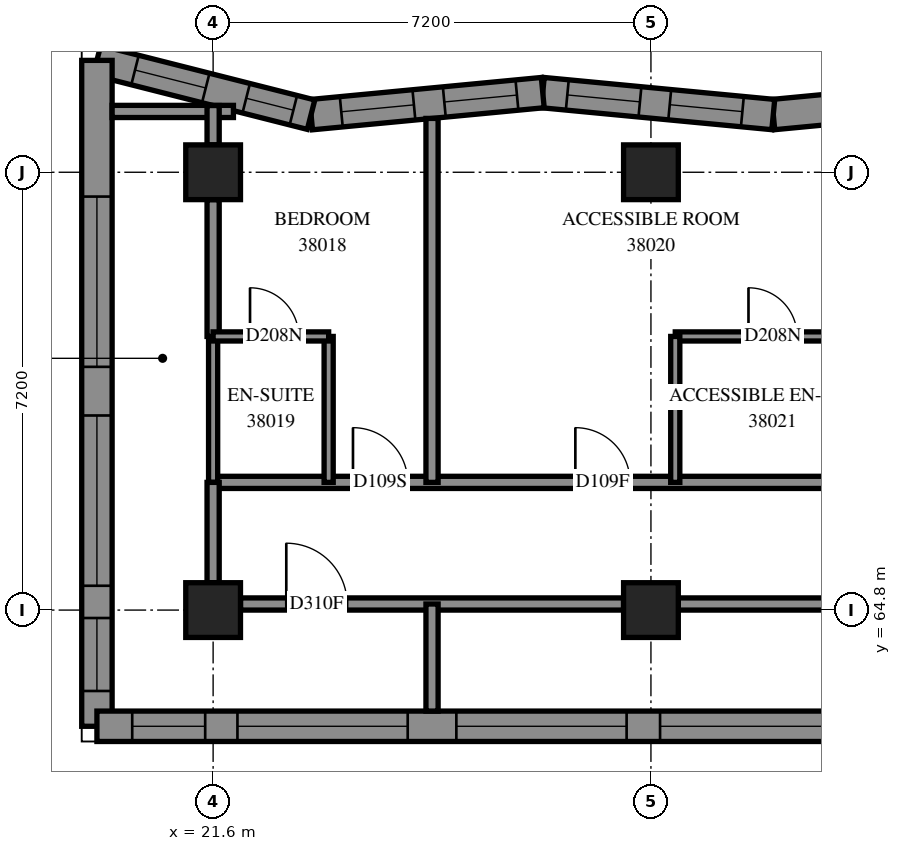
"""IFC4 building model, lengths in metres.
Left out: names, types, materials, properties, quantities, classifications, styles, units other than length and angle.
Written with IfcOpenShell. Run it as: python <this file> out.ifc"""

import sys

from ifc_helpers import new_model, si_unit, direction, frame, frame_2d, origin, origin_2d, place, context, subcontext, project, spatial, polyline, rectangle, outline, extrude, element, fill, save


model = new_model("IFC4")
c1 = context("Model", 3, precision=1e-05, world=origin(), true_north=direction((0.0, 1.0)))
c2 = subcontext(c1, "Body", "Model", "MODEL_VIEW")
j1 = project(units=[si_unit("LENGTHUNIT", "METRE"), si_unit("PLANEANGLEUNIT", "RADIAN")], contexts=[c1])
p1 = place(None, origin())
s1 = spatial("IfcSite", under=j1, at=p1, CompositionType="ELEMENT")
p2 = place(p1, origin())
s2 = spatial("IfcBuilding", under=s1, at=p2, CompositionType="ELEMENT")
p3 = place(p2, frame((0.0, 0.0, 142.2)))
s3 = spatial("IfcBuildingStorey", under=s2, at=p3, CompositionType="ELEMENT", Elevation=142.2)
for number, where, z_axis, x_axis in (
    (1, (21.6, 64.8, 0.0), (0.0, 0.0, 1.0), (1.0, 0.0, 0.0)),
    (2, (21.6, 72.0, 0.0), (0.0, 0.0, 1.0), (1.0, 0.0, 0.0)),
    (3, (28.8, 64.8, 0.0), (0.0, 0.0, 1.0), (1.0, 0.0, 0.0)),
    (4, (28.8, 72.0, 0.0), (0.0, 0.0, 1.0), (1.0, 0.0, 0.0)),
):
    element("IfcColumn", number, at=place(p3, frame(where, z_axis=z_axis, x_axis=x_axis)), inside=s3, PredefinedType="COLUMN", context=c2, shape_type="SweptSolid", body=[
        extrude(rectangle(XDim=0.9, YDim=0.9, at=origin_2d()), origin(), (0.0, 0.0, 1.0), 3.1),
    ])
p4 = place(p3, frame((34.603, 73.31, 0.0), z_axis=(0.0, 0.0, 1.0), x_axis=(-0.9954966527, -0.0947967005, 0.0)))
e5 = element("IfcWall", 5, at=p4, inside=s3, PredefinedType="SOLIDWALL", context=c2, shape_type="SweptSolid", body=[
    extrude(outline(polyline([(-0.024, -0.25), (3.784, -0.25), (3.832, 0.25), (0.024, 0.25), (-0.024, -0.25)])), origin(), (0.0, 0.0, 1.0), 3.1),
])
p5 = place(p4, frame((0.618, 0.0, 0.45)))
e6 = element("IfcOpeningElement", 6, at=p5, cuts=e5, PredefinedType="OPENING", context=c2, shape_type="SweptSolid", body=[
    extrude(rectangle(XDim=1.2, YDim=2.5, at=frame_2d((0.6, 1.25))), frame((0.0, 0.26, 0.0), z_axis=(0.0, -1.0, 0.0), x_axis=(1.0, 0.0, 0.0)), (0.0, 0.0, 1.0), 0.52),
])
p6 = place(p3, frame((30.812, 72.949, 0.0), z_axis=(0.0, 0.0, 1.0), x_axis=(-0.9954966527, 0.0947967005, 0.0)))
e7 = element("IfcWall", 7, at=p6, inside=s3, PredefinedType="SOLIDWALL", context=c2, shape_type="SweptSolid", body=[
    extrude(outline(polyline([(0.024, -0.25), (3.832, -0.25), (3.784, 0.25), (-0.024, 0.25), (0.024, -0.25)])), origin(), (0.0, 0.0, 1.0), 3.1),
])
p7 = place(p6, frame((0.511, 0.0, 0.45)))
e8 = element("IfcOpeningElement", 8, at=p7, cuts=e7, PredefinedType="OPENING", context=c2, shape_type="SweptSolid", body=[
    extrude(rectangle(XDim=1.2, YDim=2.5, at=frame_2d((0.6, 1.25))), frame((0.0, 0.26, 0.0), z_axis=(0.0, -1.0, 0.0), x_axis=(1.0, 0.0, 0.0)), (0.0, 0.0, 1.0), 0.52),
])
p8 = place(p6, frame((2.203, 0.0, 0.45)))
e9 = element("IfcOpeningElement", 9, at=p8, cuts=e7, PredefinedType="OPENING", context=c2, shape_type="SweptSolid", body=[
    extrude(rectangle(XDim=1.2, YDim=2.5, at=frame_2d((0.6, 1.25))), frame((0.0, 0.26, 0.0), z_axis=(0.0, -1.0, 0.0), x_axis=(1.0, 0.0, 0.0)), (0.0, 0.0, 1.0), 0.52),
])
p9 = place(p3, frame((27.021, 73.31, 0.0), z_axis=(0.0, 0.0, 1.0), x_axis=(-0.9954953552, -0.0948103255, 0.0)))
e10 = element("IfcWall", 10, at=p9, inside=s3, PredefinedType="SOLIDWALL", context=c2, shape_type="SweptSolid", body=[
    extrude(outline(polyline([(-0.024, -0.25), (3.784, -0.25), (3.871, 0.25), (0.024, 0.25), (-0.024, -0.25)])), origin(), (0.0, 0.0, 1.0), 3.1),
])
p10 = place(p9, frame((0.426, 0.0, 0.45)))
e11 = element("IfcOpeningElement", 11, at=p10, cuts=e10, PredefinedType="OPENING", context=c2, shape_type="SweptSolid", body=[
    extrude(rectangle(XDim=1.2, YDim=2.5, at=frame_2d((0.6, 1.25))), frame((0.0, 0.26, 0.0), z_axis=(0.0, -1.0, 0.0), x_axis=(1.0, 0.0, 0.0)), (0.0, 0.0, 1.0), 0.52),
])
p11 = place(p9, frame((2.128, 0.0, 0.45)))
e12 = element("IfcOpeningElement", 12, at=p11, cuts=e10, PredefinedType="OPENING", context=c2, shape_type="SweptSolid", body=[
    extrude(rectangle(XDim=1.2, YDim=2.5, at=frame_2d((0.6, 1.25))), frame((0.0, 0.26, 0.0), z_axis=(0.0, -1.0, 0.0), x_axis=(1.0, 0.0, 0.0)), (0.0, 0.0, 1.0), 0.52),
])
p12 = place(p3, frame((23.211, 72.947, 0.0), z_axis=(0.0, 0.0, 1.0), x_axis=(-0.9693406445, 0.2457208068, 0.0)))
e13 = element("IfcWall", 13, at=p12, inside=s3, PredefinedType="SOLIDWALL", context=c2, shape_type="SweptSolid", body=[
    extrude(outline(polyline([(0.043, -0.25), (3.954, -0.25), (3.312, 0.25), (-0.043, 0.25), (0.043, -0.25)])), origin(), (0.0, 0.0, 1.0), 3.1),
])
p13 = place(p12, frame((1.787, 0.0, 0.45)))
e14 = element("IfcOpeningElement", 14, at=p13, cuts=e13, PredefinedType="OPENING", context=c2, shape_type="SweptSolid", body=[
    extrude(rectangle(XDim=1.2, YDim=2.5, at=frame_2d((0.6, 1.25))), frame((0.0, 0.26, 0.0), z_axis=(0.0, -1.0, 0.0), x_axis=(1.0, 0.0, 0.0)), (0.0, 0.0, 1.0), 0.52),
])
p14 = place(p12, frame((0.3, 0.0, 0.45)))
e15 = element("IfcOpeningElement", 15, at=p14, cuts=e13, PredefinedType="OPENING", context=c2, shape_type="SweptSolid", body=[
    extrude(rectangle(XDim=0.8, YDim=2.5, at=frame_2d((0.4, 1.25))), frame((0.0, 0.26, 0.0), z_axis=(0.0, -1.0, 0.0), x_axis=(1.0, 0.0, 0.0)), (0.0, 0.0, 1.0), 0.52),
])
p15 = place(p3, frame((19.689, 73.84, 0.0), z_axis=(0.0, 0.0, 1.0), x_axis=(0.0, -1.0, 0.0)))
e16 = element("IfcWall", 16, at=p15, inside=s3, PredefinedType="SOLIDWALL", context=c2, shape_type="SweptSolid", body=[
    extrude(outline(polyline([(-0.321, -0.25), (11.201, -0.25), (10.701, 0.25), (0.321, 0.25), (-0.321, -0.25)])), origin(), (0.0, 0.0, 1.0), 3.1),
])
p16 = place(p15, frame((2.24, 0.0, 0.45)))
e17 = element("IfcOpeningElement", 17, at=p16, cuts=e16, PredefinedType="OPENING", context=c2, shape_type="SweptSolid", body=[
    extrude(rectangle(XDim=2.8, YDim=2.5, at=frame_2d((1.4, 1.25))), frame((0.0, 0.26, 0.0), z_axis=(0.0, -1.0, 0.0), x_axis=(1.0, 0.0, 0.0)), (0.0, 0.0, 1.0), 0.52),
])
p17 = place(p15, frame((5.84, 0.0, 0.45)))
e18 = element("IfcOpeningElement", 18, at=p17, cuts=e16, PredefinedType="OPENING", context=c2, shape_type="SweptSolid", body=[
    extrude(rectangle(XDim=2.8, YDim=2.5, at=frame_2d((1.4, 1.25))), frame((0.0, 0.26, 0.0), z_axis=(0.0, -1.0, 0.0), x_axis=(1.0, 0.0, 0.0)), (0.0, 0.0, 1.0), 0.52),
])
p18 = place(p15, frame((9.17, 0.0, 0.45)))
e19 = element("IfcOpeningElement", 19, at=p18, cuts=e16, PredefinedType="OPENING", context=c2, shape_type="SweptSolid", body=[
    extrude(rectangle(XDim=1.2, YDim=2.5, at=frame_2d((0.6, 1.25))), frame((0.0, 0.26, 0.0), z_axis=(0.0, -1.0, 0.0), x_axis=(1.0, 0.0, 0.0)), (0.0, 0.0, 1.0), 0.52),
])
p19 = place(p3, frame((19.689, 62.889, 0.0), z_axis=(0.0, 0.0, 1.0), x_axis=(1.0, 0.0, 0.0)))
e20 = element("IfcWall", 20, at=p19, inside=s3, PredefinedType="SOLIDWALL", context=c2, shape_type="SweptSolid", body=[
    extrude(outline(polyline([(-0.25, -0.25), (15.111, -0.25), (15.611, 0.25), (0.25, 0.25), (-0.25, -0.25)])), origin(), (0.0, 0.0, 1.0), 3.1),
])
p20 = place(p19, frame((2.311, 0.0, 0.45)))
e21 = element("IfcOpeningElement", 21, at=p20, cuts=e20, PredefinedType="OPENING", context=c2, shape_type="SweptSolid", body=[
    extrude(rectangle(XDim=2.8, YDim=2.5, at=frame_2d((1.4, 1.25))), frame((0.0, 0.26, 0.0), z_axis=(0.0, -1.0, 0.0), x_axis=(1.0, 0.0, 0.0)), (0.0, 0.0, 1.0), 0.52),
])
p21 = place(p19, frame((5.911, 0.0, 0.45)))
e22 = element("IfcOpeningElement", 22, at=p21, cuts=e20, PredefinedType="OPENING", context=c2, shape_type="SweptSolid", body=[
    extrude(rectangle(XDim=2.8, YDim=2.5, at=frame_2d((1.4, 1.25))), frame((0.0, 0.26, 0.0), z_axis=(0.0, -1.0, 0.0), x_axis=(1.0, 0.0, 0.0)), (0.0, 0.0, 1.0), 0.52),
])
p22 = place(p19, frame((9.261, 0.0, 0.45)))
e23 = element("IfcOpeningElement", 23, at=p22, cuts=e20, PredefinedType="OPENING", context=c2, shape_type="SweptSolid", body=[
    extrude(rectangle(XDim=2.8, YDim=2.5, at=frame_2d((1.4, 1.25))), frame((0.0, 0.26, 0.0), z_axis=(0.0, -1.0, 0.0), x_axis=(1.0, 0.0, 0.0)), (0.0, 0.0, 1.0), 0.52),
])
p23 = place(p19, frame((0.581, 0.0, 0.45)))
e24 = element("IfcOpeningElement", 24, at=p23, cuts=e20, PredefinedType="OPENING", context=c2, shape_type="SweptSolid", body=[
    extrude(rectangle(XDim=1.2, YDim=2.5, at=frame_2d((0.6, 1.25))), frame((0.0, 0.26, 0.0), z_axis=(0.0, -1.0, 0.0), x_axis=(1.0, 0.0, 0.0)), (0.0, 0.0, 1.0), 0.52),
])
p24 = place(p19, frame((13.336, 0.0, 0.45)))
e25 = element("IfcOpeningElement", 25, at=p24, cuts=e20, PredefinedType="OPENING", context=c2, shape_type="SweptSolid", body=[
    extrude(rectangle(XDim=1.2, YDim=2.5, at=frame_2d((0.6, 1.25))), frame((0.0, 0.26, 0.0), z_axis=(0.0, -1.0, 0.0), x_axis=(1.0, 0.0, 0.0)), (0.0, 0.0, 1.0), 0.52),
])
p25 = place(p3, frame((21.6, 66.9, 0.0), z_axis=(0.0, 0.0, 1.0), x_axis=(1.0, 0.0, 0.0)))
e26 = element("IfcWall", 26, at=p25, inside=s3, PredefinedType="PARTITIONING", context=c2, shape_type="SweptSolid", body=[
    extrude(rectangle(XDim=19.0, YDim=0.2, at=frame_2d((9.5, 0.0))), origin(), (0.0, 0.0, 1.0), 3.1),
])
p26 = place(p25, frame((2.3, 0.0, 0.0)))
e27 = element("IfcOpeningElement", 27, at=p26, cuts=e26, PredefinedType="OPENING", context=c2, shape_type="SweptSolid", body=[
    extrude(rectangle(XDim=0.9, YDim=2.1, at=frame_2d((0.45, 1.05))), frame((0.0, 0.11, 0.0), z_axis=(0.0, -1.0, 0.0), x_axis=(1.0, 0.0, 0.0)), (0.0, 0.0, 1.0), 0.22),
])
p27 = place(p25, frame((5.957, 0.0, 0.0)))
e28 = element("IfcOpeningElement", 28, at=p27, cuts=e26, PredefinedType="OPENING", context=c2, shape_type="SweptSolid", body=[
    extrude(rectangle(XDim=0.9, YDim=2.1, at=frame_2d((0.45, 1.05))), frame((0.0, 0.11, 0.0), z_axis=(0.0, -1.0, 0.0), x_axis=(1.0, 0.0, 0.0)), (0.0, 0.0, 1.0), 0.22),
])
p28 = place(p25, frame((13.057, 0.0, 0.0)))
e29 = element("IfcOpeningElement", 29, at=p28, cuts=e26, PredefinedType="OPENING", context=c2, shape_type="SweptSolid", body=[
    extrude(rectangle(XDim=0.9, YDim=2.1, at=frame_2d((0.45, 1.05))), frame((0.0, 0.11, 0.0), z_axis=(0.0, -1.0, 0.0), x_axis=(1.0, 0.0, 0.0)), (0.0, 0.0, 1.0), 0.22),
])
p29 = place(p3, frame((22.05, 64.9, 0.0), z_axis=(0.0, 0.0, 1.0), x_axis=(1.0, 0.0, 0.0)))
e30 = element("IfcWall", 30, at=p29, inside=s3, PredefinedType="PARTITIONING", context=c2, shape_type="SweptSolid", body=[
    extrude(rectangle(XDim=6.3, YDim=0.2, at=frame_2d((3.15, 0.0))), origin(), (0.0, 0.0, 1.0), 2.6),
])
p30 = place(p29, frame((0.753, 0.0, 0.0)))
e31 = element("IfcOpeningElement", 31, at=p30, cuts=e30, PredefinedType="OPENING", context=c2, shape_type="SweptSolid", body=[
    extrude(rectangle(XDim=1.0, YDim=2.1, at=frame_2d((0.5, 1.05))), frame((0.0, 0.11, 0.0), z_axis=(0.0, -1.0, 0.0), x_axis=(1.0, 0.0, 0.0)), (0.0, 0.0, 1.0), 0.22),
])
p31 = place(p3, frame((29.25, 64.9, 0.0), z_axis=(0.0, 0.0, 1.0), x_axis=(1.0, 0.0, 0.0)))
e32 = element("IfcWall", 32, at=p31, inside=s3, PredefinedType="PARTITIONING", context=c2, shape_type="SweptSolid", body=[
    extrude(rectangle(XDim=6.3, YDim=0.2, at=frame_2d((3.15, 0.0))), origin(), (0.0, 0.0, 1.0), 2.6),
])
p32 = place(p31, frame((4.86, 0.0, 0.0)))
e33 = element("IfcOpeningElement", 33, at=p32, cuts=e32, PredefinedType="OPENING", context=c2, shape_type="SweptSolid", body=[
    extrude(rectangle(XDim=1.0, YDim=2.1, at=frame_2d((0.5, 1.05))), frame((0.0, 0.11, 0.0), z_axis=(0.0, -1.0, 0.0), x_axis=(1.0, 0.0, 0.0)), (0.0, 0.0, 1.0), 0.22),
])
p33 = place(p3, frame((25.2, 66.9, 0.0), z_axis=(0.0, 0.0, 1.0), x_axis=(0.0, 1.0, 0.0)))
e34 = element("IfcWall", 34, at=p33, inside=s3, PredefinedType="PARTITIONING", context=c2, shape_type="SweptSolid", body=[
    extrude(rectangle(XDim=5.985, YDim=0.2, at=frame_2d((2.993, 0.0))), origin(), (0.0, 0.0, 1.0), 3.1),
])
p34 = place(p3, frame((29.2, 69.3, 0.0), z_axis=(0.0, 0.0, 1.0), x_axis=(1.0, 0.0, 0.0)))
e35 = element("IfcWall", 35, at=p34, inside=s3, PredefinedType="PARTITIONING", context=c2, shape_type="SweptSolid", body=[
    extrude(rectangle(XDim=3.2, YDim=0.15, at=frame_2d((1.6, 0.0))), origin(), (0.0, 0.0, 1.0), 3.1),
])
p35 = place(p34, frame((1.204, 0.0, 0.0)))
e36 = element("IfcOpeningElement", 36, at=p35, cuts=e35, PredefinedType="OPENING", context=c2, shape_type="SweptSolid", body=[
    extrude(rectangle(XDim=0.8, YDim=2.1, at=frame_2d((0.4, 1.05))), frame((0.0, 0.085, 0.0), z_axis=(0.0, -1.0, 0.0), x_axis=(1.0, 0.0, 0.0)), (0.0, 0.0, 1.0), 0.17),
])
p36 = place(p3, frame((21.6, 66.9, 0.0), z_axis=(0.0, 0.0, 1.0), x_axis=(0.0, 1.0, 0.0)))
e37 = element("IfcWall", 37, at=p36, inside=s3, PredefinedType="PARTITIONING", context=c2, shape_type="SweptSolid", body=[
    extrude(rectangle(XDim=2.4, YDim=0.15, at=frame_2d((1.2, 0.0))), origin(), (0.0, 0.0, 1.0), 2.6),
])
for number, where, z_axis, x_axis in (
    (38, (23.5, 66.9, 0.0), (0.0, 0.0, 1.0), (0.0, 1.0, 0.0)),
    (39, (29.2, 66.9, 0.0), (0.0, 0.0, 1.0), (0.0, 1.0, 0.0)),
):
    element("IfcWall", number, at=place(p3, frame(where, z_axis=z_axis, x_axis=x_axis)), inside=s3, PredefinedType="PARTITIONING", context=c2, shape_type="SweptSolid", body=[
        extrude(rectangle(XDim=2.4, YDim=0.15, at=frame_2d((1.2, 0.0))), origin(), (0.0, 0.0, 1.0), 3.1),
    ])
p37 = place(p3, frame((21.6, 69.3, 0.0), z_axis=(0.0, 0.0, 1.0), x_axis=(0.0, 1.0, 0.0)))
e40 = element("IfcWall", 40, at=p37, inside=s3, PredefinedType="PARTITIONING", context=c2, shape_type="SweptSolid", body=[
    extrude(rectangle(XDim=2.25, YDim=0.2, at=frame_2d((1.125, 0.0))), origin(), (0.0, 0.0, 1.0), 2.6),
])
p38 = place(p3, frame((19.939, 73.0, 0.0), z_axis=(0.0, 0.0, 1.0), x_axis=(1.0, 0.0, 0.0)))
e41 = element("IfcWall", 41, at=p38, inside=s3, PredefinedType="PARTITIONING", context=c2, shape_type="SweptSolid", body=[
    extrude(rectangle(XDim=1.995, YDim=0.2, at=frame_2d((0.998, 0.0))), origin(), (0.0, 0.0, 1.0), 3.1),
])
p39 = place(p3, frame((21.6, 69.3, 0.0), z_axis=(0.0, 0.0, 1.0), x_axis=(1.0, 0.0, 0.0)))
e42 = element("IfcWall", 42, at=p39, inside=s3, PredefinedType="PARTITIONING", context=c2, shape_type="SweptSolid", body=[
    extrude(rectangle(XDim=1.9, YDim=0.15, at=frame_2d((0.95, 0.0))), origin(), (0.0, 0.0, 1.0), 3.1),
])
p40 = place(p39, frame((0.607, 0.0, 0.0)))
e43 = element("IfcOpeningElement", 43, at=p40, cuts=e42, PredefinedType="OPENING", context=c2, shape_type="SweptSolid", body=[
    extrude(rectangle(XDim=0.8, YDim=2.1, at=frame_2d((0.4, 1.05))), frame((0.0, 0.085, 0.0), z_axis=(0.0, -1.0, 0.0), x_axis=(1.0, 0.0, 0.0)), (0.0, 0.0, 1.0), 0.17),
])
p41 = place(p3, frame((25.2, 63.139, 0.0), z_axis=(0.0, 0.0, 1.0), x_axis=(0.0, 1.0, 0.0)))
e44 = element("IfcWall", 44, at=p41, inside=s3, PredefinedType="PARTITIONING", context=c2, shape_type="SweptSolid", body=[
    extrude(rectangle(XDim=1.761, YDim=0.2, at=frame_2d((0.88, 0.0))), origin(), (0.0, 0.0, 1.0), 3.1),
])
p42 = place(p3, frame((21.6, 65.25, 0.0), z_axis=(0.0, 0.0, 1.0), x_axis=(0.0, 1.0, 0.0)))
e45 = element("IfcWall", 45, at=p42, inside=s3, PredefinedType="PARTITIONING", context=c2, shape_type="SweptSolid", body=[
    extrude(rectangle(XDim=1.65, YDim=0.2, at=frame_2d((0.825, 0.0))), origin(), (0.0, 0.0, 1.0), 2.6),
])
p43 = place(p3, frame((21.6, 72.45, 0.0), z_axis=(0.0, 0.0, 1.0), x_axis=(0.0, 1.0, 0.0)))
e46 = element("IfcWall", 46, at=p43, inside=s3, PredefinedType="PARTITIONING", context=c2, shape_type="SweptSolid", body=[
    extrude(rectangle(XDim=0.647, YDim=0.2, at=frame_2d((0.324, 0.0))), origin(), (0.0, 0.0, 1.0), 3.1),
])
p44 = place(p7, origin())
e47 = element("IfcWindow", 47, at=p44, inside=s3, PartitioningType="SINGLE_PANEL", PredefinedType="WINDOW", context=c2, shape_type="SweptSolid", body=[
    extrude(rectangle(XDim=1.2, YDim=2.5, at=frame_2d((0.6, 1.25))), frame((0.0, 0.18, 0.0), z_axis=(0.0, -1.0, 0.0), x_axis=(1.0, 0.0, 0.0)), (0.0, 0.0, 1.0), 0.06),
])
fill(e8, e47)
p45 = place(p8, origin())
e48 = element("IfcWindow", 48, at=p45, inside=s3, PartitioningType="SINGLE_PANEL", PredefinedType="WINDOW", context=c2, shape_type="SweptSolid", body=[
    extrude(rectangle(XDim=1.2, YDim=2.5, at=frame_2d((0.6, 1.25))), frame((0.0, 0.18, 0.0), z_axis=(0.0, -1.0, 0.0), x_axis=(1.0, 0.0, 0.0)), (0.0, 0.0, 1.0), 0.06),
])
fill(e9, e48)
p46 = place(p10, origin())
e49 = element("IfcWindow", 49, at=p46, inside=s3, PartitioningType="SINGLE_PANEL", PredefinedType="WINDOW", context=c2, shape_type="SweptSolid", body=[
    extrude(rectangle(XDim=1.2, YDim=2.5, at=frame_2d((0.6, 1.25))), frame((0.0, 0.18, 0.0), z_axis=(0.0, -1.0, 0.0), x_axis=(1.0, 0.0, 0.0)), (0.0, 0.0, 1.0), 0.06),
])
fill(e11, e49)
p47 = place(p11, origin())
e50 = element("IfcWindow", 50, at=p47, inside=s3, PartitioningType="SINGLE_PANEL", PredefinedType="WINDOW", context=c2, shape_type="SweptSolid", body=[
    extrude(rectangle(XDim=1.2, YDim=2.5, at=frame_2d((0.6, 1.25))), frame((0.0, 0.18, 0.0), z_axis=(0.0, -1.0, 0.0), x_axis=(1.0, 0.0, 0.0)), (0.0, 0.0, 1.0), 0.06),
])
fill(e12, e50)
p48 = place(p13, origin())
e51 = element("IfcWindow", 51, at=p48, inside=s3, PartitioningType="SINGLE_PANEL", PredefinedType="WINDOW", context=c2, shape_type="SweptSolid", body=[
    extrude(rectangle(XDim=1.2, YDim=2.5, at=frame_2d((0.6, 1.25))), frame((0.0, 0.18, 0.0), z_axis=(0.0, -1.0, 0.0), x_axis=(1.0, 0.0, 0.0)), (0.0, 0.0, 1.0), 0.06),
])
fill(e14, e51)
p49 = place(p16, origin())
e52 = element("IfcWindow", 52, at=p49, inside=s3, PartitioningType="SINGLE_PANEL", PredefinedType="WINDOW", context=c2, shape_type="SweptSolid", body=[
    extrude(rectangle(XDim=2.8, YDim=2.5, at=frame_2d((1.4, 1.25))), frame((0.0, 0.18, 0.0), z_axis=(0.0, -1.0, 0.0), x_axis=(1.0, 0.0, 0.0)), (0.0, 0.0, 1.0), 0.06),
])
fill(e17, e52)
p50 = place(p17, origin())
e53 = element("IfcWindow", 53, at=p50, inside=s3, PartitioningType="SINGLE_PANEL", PredefinedType="WINDOW", context=c2, shape_type="SweptSolid", body=[
    extrude(rectangle(XDim=2.8, YDim=2.5, at=frame_2d((1.4, 1.25))), frame((0.0, 0.18, 0.0), z_axis=(0.0, -1.0, 0.0), x_axis=(1.0, 0.0, 0.0)), (0.0, 0.0, 1.0), 0.06),
])
fill(e18, e53)
p51 = place(p18, origin())
e54 = element("IfcWindow", 54, at=p51, inside=s3, PartitioningType="SINGLE_PANEL", PredefinedType="WINDOW", context=c2, shape_type="SweptSolid", body=[
    extrude(rectangle(XDim=1.2, YDim=2.5, at=frame_2d((0.6, 1.25))), frame((0.0, 0.18, 0.0), z_axis=(0.0, -1.0, 0.0), x_axis=(1.0, 0.0, 0.0)), (0.0, 0.0, 1.0), 0.06),
])
fill(e19, e54)
p52 = place(p20, origin())
e55 = element("IfcWindow", 55, at=p52, inside=s3, PartitioningType="SINGLE_PANEL", PredefinedType="WINDOW", context=c2, shape_type="SweptSolid", body=[
    extrude(rectangle(XDim=2.8, YDim=2.5, at=frame_2d((1.4, 1.25))), frame((0.0, 0.18, 0.0), z_axis=(0.0, -1.0, 0.0), x_axis=(1.0, 0.0, 0.0)), (0.0, 0.0, 1.0), 0.06),
])
fill(e21, e55)
p53 = place(p21, origin())
e56 = element("IfcWindow", 56, at=p53, inside=s3, PartitioningType="SINGLE_PANEL", PredefinedType="WINDOW", context=c2, shape_type="SweptSolid", body=[
    extrude(rectangle(XDim=2.8, YDim=2.5, at=frame_2d((1.4, 1.25))), frame((0.0, 0.18, 0.0), z_axis=(0.0, -1.0, 0.0), x_axis=(1.0, 0.0, 0.0)), (0.0, 0.0, 1.0), 0.06),
])
fill(e22, e56)
p54 = place(p22, origin())
e57 = element("IfcWindow", 57, at=p54, inside=s3, PartitioningType="SINGLE_PANEL", PredefinedType="WINDOW", context=c2, shape_type="SweptSolid", body=[
    extrude(rectangle(XDim=2.8, YDim=2.5, at=frame_2d((1.4, 1.25))), frame((0.0, 0.18, 0.0), z_axis=(0.0, -1.0, 0.0), x_axis=(1.0, 0.0, 0.0)), (0.0, 0.0, 1.0), 0.06),
])
fill(e23, e57)
p55 = place(p23, origin())
e58 = element("IfcWindow", 58, at=p55, inside=s3, PartitioningType="SINGLE_PANEL", PredefinedType="WINDOW", context=c2, shape_type="SweptSolid", body=[
    extrude(rectangle(XDim=1.2, YDim=2.5, at=frame_2d((0.6, 1.25))), frame((0.0, 0.18, 0.0), z_axis=(0.0, -1.0, 0.0), x_axis=(1.0, 0.0, 0.0)), (0.0, 0.0, 1.0), 0.06),
])
fill(e24, e58)
p56 = place(p30, origin())
e59 = element("IfcDoor", 59, at=p56, inside=s3, OperationType="SINGLE_SWING_RIGHT", PredefinedType="DOOR", context=c2, shape_type="SweptSolid", body=[
    extrude(rectangle(XDim=1.0, YDim=2.1, at=frame_2d((0.5, 1.05))), frame((0.0, 0.025, 0.0), z_axis=(0.0, -1.0, 0.0), x_axis=(1.0, 0.0, 0.0)), (0.0, 0.0, 1.0), 0.05),
])
fill(e31, e59)
p57 = place(p26, origin())
e60 = element("IfcDoor", 60, at=p57, inside=s3, OperationType="SINGLE_SWING_RIGHT", PredefinedType="DOOR", context=c2, shape_type="SweptSolid", body=[
    extrude(rectangle(XDim=0.9, YDim=2.1, at=frame_2d((0.45, 1.05))), frame((0.0, 0.025, 0.0), z_axis=(0.0, -1.0, 0.0), x_axis=(1.0, 0.0, 0.0)), (0.0, 0.0, 1.0), 0.05),
])
fill(e27, e60)
p58 = place(p40, origin())
e61 = element("IfcDoor", 61, at=p58, inside=s3, OperationType="SINGLE_SWING_RIGHT", PredefinedType="DOOR", context=c2, shape_type="SweptSolid", body=[
    extrude(rectangle(XDim=0.8, YDim=2.1, at=frame_2d((0.4, 1.05))), frame((0.0, 0.025, 0.0), z_axis=(0.0, -1.0, 0.0), x_axis=(1.0, 0.0, 0.0)), (0.0, 0.0, 1.0), 0.05),
])
fill(e43, e61)
p59 = place(p27, origin())
e62 = element("IfcDoor", 62, at=p59, inside=s3, OperationType="SINGLE_SWING_LEFT", PredefinedType="DOOR", context=c2, shape_type="SweptSolid", body=[
    extrude(rectangle(XDim=0.9, YDim=2.1, at=frame_2d((0.45, 1.05))), frame((0.0, 0.025, 0.0), z_axis=(0.0, -1.0, 0.0), x_axis=(1.0, 0.0, 0.0)), (0.0, 0.0, 1.0), 0.05),
])
fill(e28, e62)
p60 = place(p35, origin())
e63 = element("IfcDoor", 63, at=p60, inside=s3, OperationType="SINGLE_SWING_RIGHT", PredefinedType="DOOR", context=c2, shape_type="SweptSolid", body=[
    extrude(rectangle(XDim=0.8, YDim=2.1, at=frame_2d((0.4, 1.05))), frame((0.0, 0.025, 0.0), z_axis=(0.0, -1.0, 0.0), x_axis=(1.0, 0.0, 0.0)), (0.0, 0.0, 1.0), 0.05),
])
fill(e36, e63)
p61 = place(p14, origin())
e64 = element("IfcWindow", 64, at=p61, inside=s3, PartitioningType="SINGLE_PANEL", PredefinedType="WINDOW", context=c2, shape_type="SweptSolid", body=[
    extrude(rectangle(XDim=0.8, YDim=2.5, at=frame_2d((0.4, 1.25))), frame((0.0, 0.18, 0.0), z_axis=(0.0, -1.0, 0.0), x_axis=(1.0, 0.0, 0.0)), (0.0, 0.0, 1.0), 0.06),
])
fill(e15, e64)
save(model, sys.argv[1])
